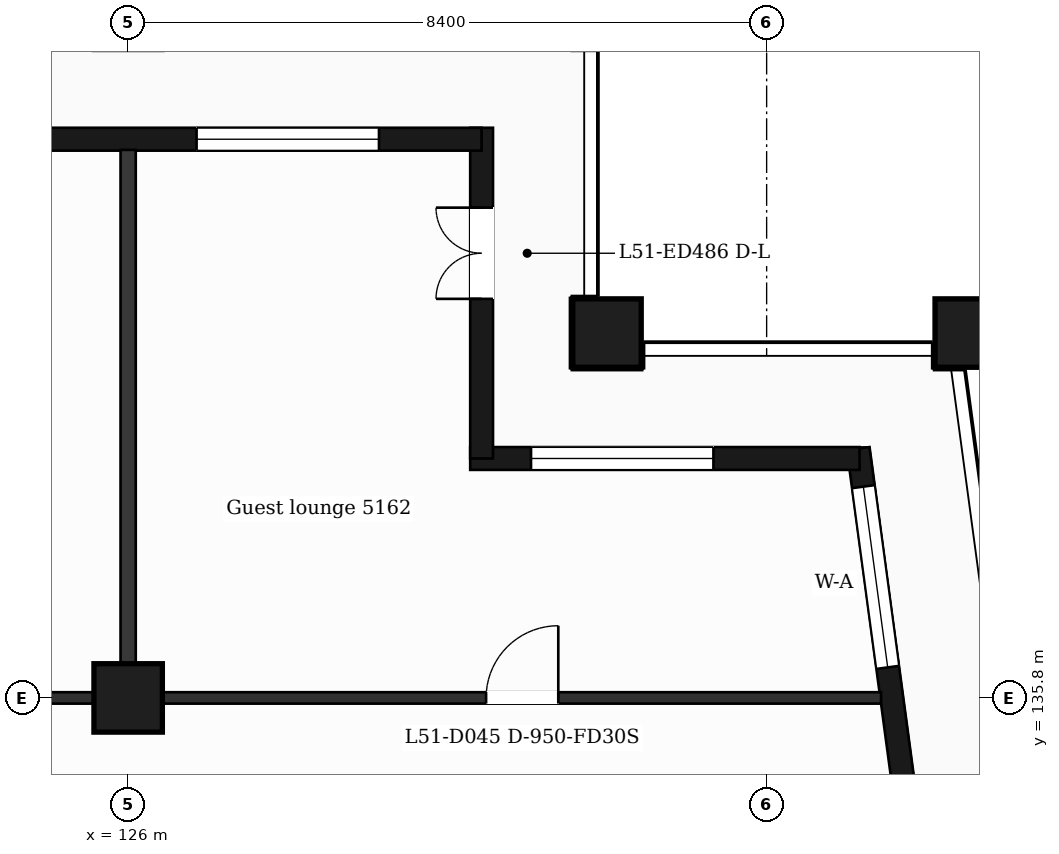
"""IFC4 building model, lengths in metres.
Left out: names, types, materials, properties, quantities, classifications, styles, units other than length and angle.
Written with IfcOpenShell. Run it as: python <this file> out.ifc"""

import sys

from ifc_helpers import new_model, si_unit, direction, frame, frame_2d, origin, origin_2d, place, context, subcontext, project, spatial, rectangle, extrude, element, fill, save


model = new_model("IFC4")
c1 = context("Model", 3, precision=1e-05, world=origin(), true_north=direction((0.0, 1.0)))
c2 = subcontext(c1, "Body", "Model", "MODEL_VIEW")
j1 = project(units=[si_unit("LENGTHUNIT", "METRE"), si_unit("PLANEANGLEUNIT", "RADIAN")], contexts=[c1])
p1 = place(None, origin())
s1 = spatial("IfcSite", under=j1, at=p1, CompositionType="ELEMENT")
p2 = place(p1, origin())
s2 = spatial("IfcBuilding", under=s1, at=p2, CompositionType="ELEMENT")
p3 = place(p2, frame((0.0, 0.0, 213.3)))
s3 = spatial("IfcBuildingStorey", under=s2, at=p3, CompositionType="ELEMENT", Elevation=213.3)
for number, where, z_axis, x_axis in (
    (1, (132.3, 140.6, 0.0), (0.0, 0.0, 1.0), (1.0, 0.0, 0.0)),
    (2, (137.065, 140.6, 0.0), (0.0, 0.0, 1.0), (1.0, 0.0, 0.0)),
    (3, (126.0, 135.8, 0.0), (0.0, 0.0, 1.0), (1.0, 0.0, 0.0)),
):
    element("IfcColumn", number, at=place(p3, frame(where, z_axis=z_axis, x_axis=x_axis)), inside=s3, PredefinedType="COLUMN", context=c2, shape_type="SweptSolid", body=[
        extrude(rectangle(XDim=0.9, YDim=0.9, at=origin_2d()), origin(), (0.0, 0.0, 1.0), 3.7),
    ])
p4 = place(p3, frame((136.504, 132.4, 0.0), z_axis=(0.0, 0.0, 1.0), x_axis=(-0.133399697462, 0.99106231929, 0.0)))
e4 = element("IfcWall", 4, at=p4, inside=s3, PredefinedType="SOLIDWALL", context=c2, shape_type="SweptSolid", body=[
    extrude(rectangle(XDim=6.74, YDim=0.3, at=frame_2d((3.37, 0.0))), origin(), (0.0, 0.0, 1.0), 3.38),
])
p5 = place(p4, frame((1.115, 0.0, 0.0)))
e5 = element("IfcOpeningElement", 5, at=p5, cuts=e4, PredefinedType="OPENING", context=c2, shape_type="SweptSolid", body=[
    extrude(rectangle(XDim=1.2, YDim=2.4, at=frame_2d((0.6, 1.2))), frame((0.0, 0.16, 0.0), z_axis=(0.0, -1.0, 0.0), x_axis=(1.0, 0.0, 0.0)), (0.0, 0.0, 1.0), 0.32),
])
p6 = place(p4, frame((3.835, 0.0, 0.9)))
e6 = element("IfcOpeningElement", 6, at=p6, cuts=e4, PredefinedType="OPENING", context=c2, shape_type="SweptSolid", body=[
    extrude(rectangle(XDim=2.4, YDim=2.1, at=frame_2d((1.2, 1.05))), frame((0.0, 0.16, 0.0), z_axis=(0.0, -1.0, 0.0), x_axis=(1.0, 0.0, 0.0)), (0.0, 0.0, 1.0), 0.32),
])
p7 = place(p3, frame((135.623, 138.95, 0.0), z_axis=(0.0, 0.0, 1.0), x_axis=(-1.0, 0.0, 0.0)))
e7 = element("IfcWall", 7, at=p7, inside=s3, PredefinedType="SOLIDWALL", context=c2, shape_type="SweptSolid", body=[
    extrude(rectangle(XDim=5.123, YDim=0.3, at=frame_2d((2.561, 0.0))), origin(), (0.0, 0.0, 1.0), 3.38),
])
p8 = place(p7, frame((1.923, 0.0, 0.9)))
e8 = element("IfcOpeningElement", 8, at=p8, cuts=e7, PredefinedType="OPENING", context=c2, shape_type="SweptSolid", body=[
    extrude(rectangle(XDim=2.4, YDim=2.1, at=frame_2d((1.2, 1.05))), frame((0.0, 0.16, 0.0), z_axis=(0.0, -1.0, 0.0), x_axis=(1.0, 0.0, 0.0)), (0.0, 0.0, 1.0), 0.32),
])
p9 = place(p3, frame((130.65, 138.95, 0.0), z_axis=(0.0, 0.0, 1.0), x_axis=(0.0, 1.0, 0.0)))
e9 = element("IfcWall", 9, at=p9, inside=s3, PredefinedType="SOLIDWALL", context=c2, shape_type="SweptSolid", body=[
    extrude(rectangle(XDim=4.35, YDim=0.3, at=frame_2d((2.175, 0.0))), origin(), (0.0, 0.0, 1.0), 3.38),
])
p10 = place(p9, frame((2.1, 0.0, 0.0)))
e10 = element("IfcOpeningElement", 10, at=p10, cuts=e9, PredefinedType="OPENING", context=c2, shape_type="SweptSolid", body=[
    extrude(rectangle(XDim=1.2, YDim=2.4, at=frame_2d((0.6, 1.2))), frame((0.0, 0.16, 0.0), z_axis=(0.0, -1.0, 0.0), x_axis=(1.0, 0.0, 0.0)), (0.0, 0.0, 1.0), 0.32),
])
p11 = place(p3, frame((130.65, 143.15, 0.0), z_axis=(0.0, 0.0, 1.0), x_axis=(-1.0, 0.0, 0.0)))
e11 = element("IfcWall", 11, at=p11, inside=s3, PredefinedType="SOLIDWALL", context=c2, shape_type="SweptSolid", body=[
    extrude(rectangle(XDim=14.25, YDim=0.3, at=frame_2d((7.125, 0.0))), origin(), (0.0, 0.0, 1.0), 3.38),
])
p12 = place(p11, frame((1.35, 0.0, 0.9)))
e12 = element("IfcOpeningElement", 12, at=p12, cuts=e11, PredefinedType="OPENING", context=c2, shape_type="SweptSolid", body=[
    extrude(rectangle(XDim=2.4, YDim=2.1, at=frame_2d((1.2, 1.05))), frame((0.0, 0.16, 0.0), z_axis=(0.0, -1.0, 0.0), x_axis=(1.0, 0.0, 0.0)), (0.0, 0.0, 1.0), 0.32),
])
p13 = place(p11, frame((6.15, 0.0, 0.0)))
e13 = element("IfcOpeningElement", 13, at=p13, cuts=e11, PredefinedType="OPENING", context=c2, shape_type="SweptSolid", body=[
    extrude(rectangle(XDim=1.2, YDim=2.4, at=frame_2d((0.6, 1.2))), frame((0.0, 0.16, 0.0), z_axis=(0.0, -1.0, 0.0), x_axis=(1.0, 0.0, 0.0)), (0.0, 0.0, 1.0), 0.32),
])
p14 = place(p11, frame((9.75, 0.0, 0.9)))
e14 = element("IfcOpeningElement", 14, at=p14, cuts=e11, PredefinedType="OPENING", context=c2, shape_type="SweptSolid", body=[
    extrude(rectangle(XDim=2.4, YDim=2.1, at=frame_2d((1.2, 1.05))), frame((0.0, 0.16, 0.0), z_axis=(0.0, -1.0, 0.0), x_axis=(1.0, 0.0, 0.0)), (0.0, 0.0, 1.0), 0.32),
])
p15 = place(p3, frame((90.895, 135.8, 0.0), z_axis=(0.0, 0.0, 1.0), x_axis=(1.0, 0.0, 0.0)))
e15 = element("IfcWall", 15, at=p15, inside=s3, PredefinedType="PARTITIONING", context=c2, shape_type="SweptSolid", body=[
    extrude(rectangle(XDim=45.011, YDim=0.15, at=frame_2d((22.505, 0.0))), origin(), (0.0, 0.0, 1.0), 3.38),
])
p16 = place(p15, frame((6.906, 0.0, 0.0)))
e16 = element("IfcOpeningElement", 16, at=p16, cuts=e15, PredefinedType="OPENING", context=c2, shape_type="SweptSolid", body=[
    extrude(rectangle(XDim=1.0, YDim=2.1, at=frame_2d((0.5, 1.05))), frame((0.0, 0.085, 0.0), z_axis=(0.0, -1.0, 0.0), x_axis=(1.0, 0.0, 0.0)), (0.0, 0.0, 1.0), 0.17),
])
p17 = place(p15, frame((11.531, 0.0, 0.0)))
e17 = element("IfcOpeningElement", 17, at=p17, cuts=e15, PredefinedType="OPENING", context=c2, shape_type="SweptSolid", body=[
    extrude(rectangle(XDim=0.95, YDim=2.1, at=frame_2d((0.475, 1.05))), frame((0.0, 0.085, 0.0), z_axis=(0.0, -1.0, 0.0), x_axis=(1.0, 0.0, 0.0)), (0.0, 0.0, 1.0), 0.17),
])
p18 = place(p15, frame((16.667, 0.0, 0.0)))
e18 = element("IfcOpeningElement", 18, at=p18, cuts=e15, PredefinedType="OPENING", context=c2, shape_type="SweptSolid", body=[
    extrude(rectangle(XDim=0.95, YDim=2.1, at=frame_2d((0.475, 1.05))), frame((0.0, 0.085, 0.0), z_axis=(0.0, -1.0, 0.0), x_axis=(1.0, 0.0, 0.0)), (0.0, 0.0, 1.0), 0.17),
])
p19 = place(p15, frame((21.281, 0.0, 0.0)))
e19 = element("IfcOpeningElement", 19, at=p19, cuts=e15, PredefinedType="OPENING", context=c2, shape_type="SweptSolid", body=[
    extrude(rectangle(XDim=0.95, YDim=2.1, at=frame_2d((0.475, 1.05))), frame((0.0, 0.085, 0.0), z_axis=(0.0, -1.0, 0.0), x_axis=(1.0, 0.0, 0.0)), (0.0, 0.0, 1.0), 0.17),
])
p20 = place(p15, frame((28.73, 0.0, 0.0)))
e20 = element("IfcOpeningElement", 20, at=p20, cuts=e15, PredefinedType="OPENING", context=c2, shape_type="SweptSolid", body=[
    extrude(rectangle(XDim=1.0, YDim=2.1, at=frame_2d((0.5, 1.05))), frame((0.0, 0.085, 0.0), z_axis=(0.0, -1.0, 0.0), x_axis=(1.0, 0.0, 0.0)), (0.0, 0.0, 1.0), 0.17),
])
p21 = place(p15, frame((39.814, 0.0, 0.0)))
e21 = element("IfcOpeningElement", 21, at=p21, cuts=e15, PredefinedType="OPENING", context=c2, shape_type="SweptSolid", body=[
    extrude(rectangle(XDim=0.95, YDim=2.1, at=frame_2d((0.475, 1.05))), frame((0.0, 0.085, 0.0), z_axis=(0.0, -1.0, 0.0), x_axis=(1.0, 0.0, 0.0)), (0.0, 0.0, 1.0), 0.17),
])
p22 = place(p3, frame((126.0, 135.875, 0.0), z_axis=(0.0, 0.0, 1.0), x_axis=(0.0, 1.0, 0.0)))
e22 = element("IfcWall", 22, at=p22, inside=s3, PredefinedType="PARTITIONING", context=c2, shape_type="SweptSolid", body=[
    extrude(rectangle(XDim=7.135, YDim=0.2, at=frame_2d((3.567, 0.0))), origin(), (0.0, 0.0, 1.0), 3.38),
])
p23 = place(p6, origin())
e23 = element("IfcWindow", 23, at=p23, inside=s3, PartitioningType="SINGLE_PANEL", PredefinedType="WINDOW", context=c2, shape_type="SweptSolid", body=[
    extrude(rectangle(XDim=2.4, YDim=2.1, at=frame_2d((1.2, 1.05))), frame((0.0, 0.03, 0.0), z_axis=(0.0, -1.0, 0.0), x_axis=(1.0, 0.0, 0.0)), (0.0, 0.0, 1.0), 0.06),
])
fill(e6, e23)
p24 = place(p8, origin())
e24 = element("IfcWindow", 24, at=p24, inside=s3, PartitioningType="SINGLE_PANEL", PredefinedType="WINDOW", context=c2, shape_type="SweptSolid", body=[
    extrude(rectangle(XDim=2.4, YDim=2.1, at=frame_2d((1.2, 1.05))), frame((0.0, 0.03, 0.0), z_axis=(0.0, -1.0, 0.0), x_axis=(1.0, 0.0, 0.0)), (0.0, 0.0, 1.0), 0.06),
])
fill(e8, e24)
p25 = place(p10, origin())
e25 = element("IfcDoor", 25, at=p25, inside=s3, OperationType="DOUBLE_DOOR_SINGLE_SWING", PredefinedType="DOOR", context=c2, shape_type="SweptSolid", body=[
    extrude(rectangle(XDim=1.2, YDim=2.4, at=frame_2d((0.6, 1.2))), frame((0.0, 0.025, 0.0), z_axis=(0.0, -1.0, 0.0), x_axis=(1.0, 0.0, 0.0)), (0.0, 0.0, 1.0), 0.05),
])
fill(e10, e25)
p26 = place(p12, origin())
e26 = element("IfcWindow", 26, at=p26, inside=s3, PartitioningType="SINGLE_PANEL", PredefinedType="WINDOW", context=c2, shape_type="SweptSolid", body=[
    extrude(rectangle(XDim=2.4, YDim=2.1, at=frame_2d((1.2, 1.05))), frame((0.0, 0.03, 0.0), z_axis=(0.0, -1.0, 0.0), x_axis=(1.0, 0.0, 0.0)), (0.0, 0.0, 1.0), 0.06),
])
fill(e12, e26)
p27 = place(p21, origin())
e27 = element("IfcDoor", 27, at=p27, inside=s3, OperationType="SINGLE_SWING_RIGHT", PredefinedType="DOOR", context=c2, shape_type="SweptSolid", body=[
    extrude(rectangle(XDim=0.95, YDim=2.1, at=frame_2d((0.475, 1.05))), frame((0.0, 0.025, 0.0), z_axis=(0.0, -1.0, 0.0), x_axis=(1.0, 0.0, 0.0)), (0.0, 0.0, 1.0), 0.05),
])
fill(e21, e27)
save(model, sys.argv[1])
